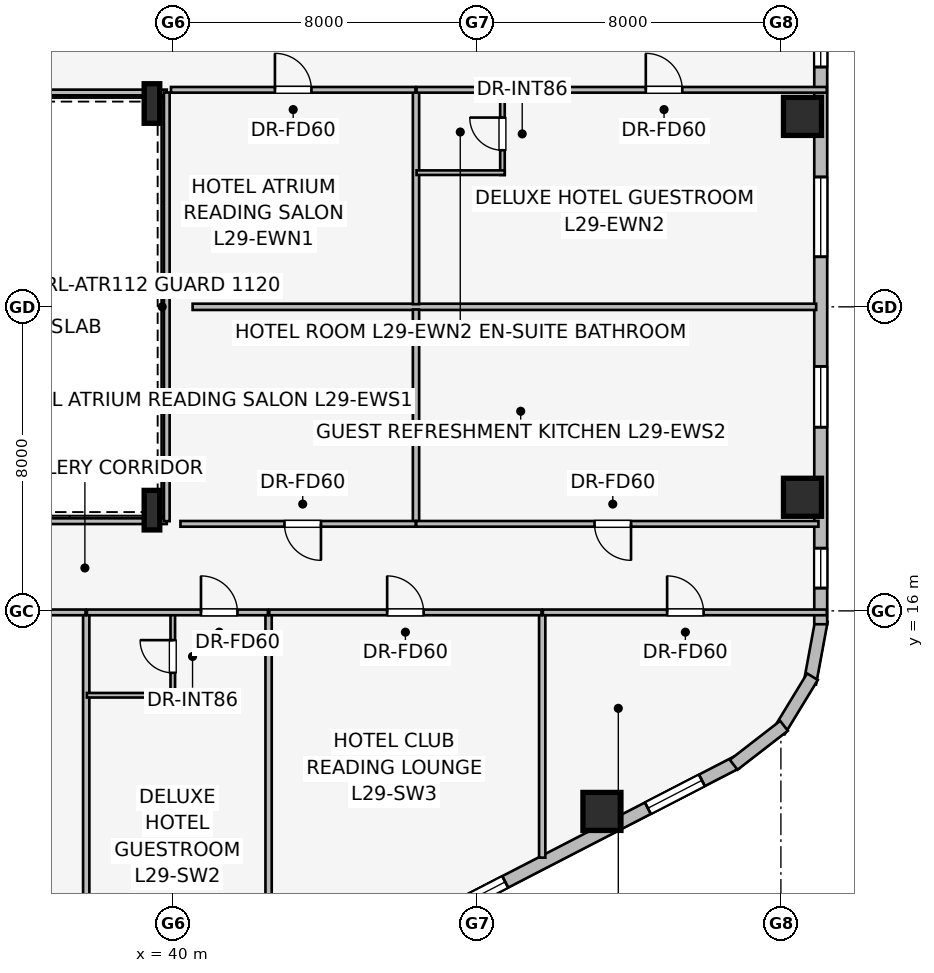
"""IFC4 building model, lengths in metres.
Left out: names, types, materials, properties, quantities, classifications, styles, units other than length and angle.
Written with IfcOpenShell. Run it as: python <this file> out.ifc"""

import sys

from ifc_helpers import new_model, si_unit, direction, frame, frame_2d, origin, origin_2d, place, context, subcontext, project, spatial, rectangle, i_section, extrude, element, fill, save


model = new_model("IFC4")
c1 = context("Model", 3, precision=1e-05, world=origin(), true_north=direction((0.0, 1.0)))
c2 = subcontext(c1, "Body", "Model", "MODEL_VIEW")
j1 = project(units=[si_unit("LENGTHUNIT", "METRE"), si_unit("PLANEANGLEUNIT", "RADIAN")], contexts=[c1])
p1 = place(None, origin())
s1 = spatial("IfcSite", under=j1, at=p1, CompositionType="ELEMENT")
p2 = place(p1, origin())
s2 = spatial("IfcBuilding", under=s1, at=p2, CompositionType="ELEMENT")
p3 = place(p2, frame((0.0, 0.0, 111.9)))
s3 = spatial("IfcBuildingStorey", under=s2, at=p3, CompositionType="ELEMENT", Elevation=111.9)
for number, where, z_axis, x_axis in (
    (1, (51.291, 10.723, 0.0), (0.0, 0.0, 1.0), (1.0, 0.0, 0.0)),
    (2, (56.568, 18.989, 0.0), (0.0, 0.0, 1.0), (1.0, 0.0, 0.0)),
    (3, (56.568, 29.011, 0.0), (0.0, 0.0, 1.0), (1.0, 0.0, 0.0)),
):
    element("IfcColumn", number, at=place(p3, frame(where, z_axis=z_axis, x_axis=x_axis)), inside=s3, PredefinedType="COLUMN", context=c2, shape_type="SweptSolid", body=[
        extrude(rectangle(XDim=1.0, YDim=1.0, at=origin_2d()), origin(), (0.0, 0.0, 1.0), 3.45),
    ])
for number, where, z_axis, x_axis in (
    (4, (39.45, 18.65, 0.0), (0.0, 0.0, 1.0), (1.0, 0.0, 0.0)),
    (5, (39.45, 29.35, 0.0), (0.0, 0.0, 1.0), (1.0, 0.0, 0.0)),
):
    element("IfcColumn", number, at=place(p3, frame(where, z_axis=z_axis, x_axis=x_axis)), inside=s3, PredefinedType="COLUMN", context=c2, shape_type="SweptSolid", body=[
        extrude(i_section(OverallWidth=0.41, OverallDepth=1.041, WebThickness=0.031, FlangeThickness=0.056, at=origin_2d()), origin(), (0.0, 0.0, 1.0), 3.45),
    ])
p4 = place(p3, frame((54.831, 12.01, 0.0), z_axis=(0.0, 0.0, 1.0), x_axis=(-0.888613612362, -0.458656568606, 0.0)))
e6 = element("IfcWall", 6, at=p4, inside=s3, PredefinedType="STANDARD", context=c2, shape_type="SweptSolid", body=[
    extrude(rectangle(XDim=18.681, YDim=0.34, at=frame_2d((9.34, 0.0))), origin(), (0.0, 0.0, 1.0), 3.16),
])
p5 = place(p4, frame((1.023, 0.0, 0.75)))
e7 = element("IfcOpeningElement", 7, at=p5, cuts=e6, PredefinedType="OPENING", context=c2, shape_type="SweptSolid", body=[
    extrude(rectangle(XDim=1.6, YDim=1.55, at=frame_2d((0.8, 0.775))), frame((0.0, 0.18, 0.0), z_axis=(0.0, -1.0, 0.0), x_axis=(1.0, 0.0, 0.0)), (0.0, 0.0, 1.0), 0.36),
])
p6 = place(p4, frame((6.848, 0.0, 0.75)))
e8 = element("IfcOpeningElement", 8, at=p6, cuts=e6, PredefinedType="OPENING", context=c2, shape_type="SweptSolid", body=[
    extrude(rectangle(XDim=2.1, YDim=1.5, at=frame_2d((1.05, 0.75))), frame((0.0, 0.18, 0.0), z_axis=(0.0, -1.0, 0.0), x_axis=(1.0, 0.0, 0.0)), (0.0, 0.0, 1.0), 0.36),
])
p7 = place(p4, frame((10.536, 0.0, 0.75)))
e9 = element("IfcOpeningElement", 9, at=p7, cuts=e6, PredefinedType="OPENING", context=c2, shape_type="SweptSolid", body=[
    extrude(rectangle(XDim=2.1, YDim=1.5, at=frame_2d((1.05, 0.75))), frame((0.0, 0.18, 0.0), z_axis=(0.0, -1.0, 0.0), x_axis=(1.0, 0.0, 0.0)), (0.0, 0.0, 1.0), 0.36),
])
p8 = place(p4, frame((16.058, 0.0, 0.75)))
e10 = element("IfcOpeningElement", 10, at=p8, cuts=e6, PredefinedType="OPENING", context=c2, shape_type="SweptSolid", body=[
    extrude(rectangle(XDim=1.6, YDim=1.55, at=frame_2d((0.8, 0.775))), frame((0.0, 0.18, 0.0), z_axis=(0.0, -1.0, 0.0), x_axis=(1.0, 0.0, 0.0)), (0.0, 0.0, 1.0), 0.36),
])
p9 = place(p3, frame((57.068, 15.742, 0.0), z_axis=(0.0, 0.0, 1.0), x_axis=(-0.181984991895, -0.983301308209, 0.0)))
e11 = element("IfcWall", 11, at=p9, inside=s3, PredefinedType="STANDARD", context=c2, shape_type="SweptSolid", body=[
    extrude(rectangle(XDim=1.677, YDim=0.33, at=frame_2d((0.838, 0.0))), origin(), (0.0, 0.0, 1.0), 3.16),
])
p10 = place(p3, frame((56.83, 14.268, 0.0), z_axis=(0.0, 0.0, 1.0), x_axis=(-0.520519429557, -0.853849824883, 0.0)))
e12 = element("IfcWall", 12, at=p10, inside=s3, PredefinedType="STANDARD", context=c2, shape_type="SweptSolid", body=[
    extrude(rectangle(XDim=1.677, YDim=0.33, at=frame_2d((0.839, 0.0))), origin(), (0.0, 0.0, 1.0), 3.16),
])
p11 = place(p3, frame((56.082, 12.976, 0.0), z_axis=(0.0, 0.0, 1.0), x_axis=(-0.790621329885, -0.612305408053, 0.0)))
e13 = element("IfcWall", 13, at=p11, inside=s3, PredefinedType="STANDARD", context=c2, shape_type="SweptSolid", body=[
    extrude(rectangle(XDim=1.676, YDim=0.33, at=frame_2d((0.838, 0.0))), origin(), (0.0, 0.0, 1.0), 3.16),
])
p12 = place(p3, frame((57.048, 32.352, 0.0), z_axis=(0.0, 0.0, 1.0), x_axis=(0.0, -1.0, 0.0)))
e14 = element("IfcWall", 14, at=p12, inside=s3, PredefinedType="STANDARD", context=c2, shape_type="SweptSolid", body=[
    extrude(rectangle(XDim=16.704, YDim=0.34, at=frame_2d((8.352, 0.0))), origin(), (0.0, 0.0, 1.0), 3.16),
])
p13 = place(p12, frame((0.992, 0.0, 0.75)))
e15 = element("IfcOpeningElement", 15, at=p13, cuts=e14, PredefinedType="OPENING", context=c2, shape_type="SweptSolid", body=[
    extrude(rectangle(XDim=1.05, YDim=1.4, at=frame_2d((0.525, 0.7))), frame((0.0, 0.18, 0.0), z_axis=(0.0, -1.0, 0.0), x_axis=(1.0, 0.0, 0.0)), (0.0, 0.0, 1.0), 0.36),
])
p14 = place(p12, frame((4.935, 0.0, 0.75)))
e16 = element("IfcOpeningElement", 16, at=p14, cuts=e14, PredefinedType="OPENING", context=c2, shape_type="SweptSolid", body=[
    extrude(rectangle(XDim=2.1, YDim=1.5, at=frame_2d((1.05, 0.75))), frame((0.0, 0.18, 0.0), z_axis=(0.0, -1.0, 0.0), x_axis=(1.0, 0.0, 0.0)), (0.0, 0.0, 1.0), 0.36),
])
p15 = place(p12, frame((9.919, 0.0, 0.75)))
e17 = element("IfcOpeningElement", 17, at=p15, cuts=e14, PredefinedType="OPENING", context=c2, shape_type="SweptSolid", body=[
    extrude(rectangle(XDim=1.6, YDim=1.55, at=frame_2d((0.8, 0.775))), frame((0.0, 0.18, 0.0), z_axis=(0.0, -1.0, 0.0), x_axis=(1.0, 0.0, 0.0)), (0.0, 0.0, 1.0), 0.36),
])
p16 = place(p12, frame((14.702, 0.0, 0.75)))
e18 = element("IfcOpeningElement", 18, at=p16, cuts=e14, PredefinedType="OPENING", context=c2, shape_type="SweptSolid", body=[
    extrude(rectangle(XDim=1.05, YDim=1.4, at=frame_2d((0.525, 0.7))), frame((0.0, 0.18, 0.0), z_axis=(0.0, -1.0, 0.0), x_axis=(1.0, 0.0, 0.0)), (0.0, 0.0, 1.0), 0.36),
])
p17 = place(p3, frame((27.675, 18.36, 0.0), z_axis=(0.0, 0.0, 1.0), x_axis=(1.0, 0.0, 0.0)))
e19 = element("IfcWall", 19, at=p17, inside=s3, PredefinedType="PARTITIONING", context=c2, shape_type="SweptSolid", body=[
    extrude(rectangle(XDim=12.165, YDim=0.15, at=frame_2d((6.083, 0.0))), origin(), (0.0, 0.0, 1.0), 2.301),
])
p18 = place(p3, frame((39.84, 29.64, 0.0), z_axis=(0.0, 0.0, 1.0), x_axis=(-1.0, 0.0, 0.0)))
e20 = element("IfcWall", 20, at=p18, inside=s3, PredefinedType="PARTITIONING", context=c2, shape_type="SweptSolid", body=[
    extrude(rectangle(XDim=12.2, YDim=0.15, at=frame_2d((6.1, 0.0))), origin(), (0.0, 0.0, 1.0), 2.301),
])
p19 = place(p3, frame((39.84, 18.36, 0.0), z_axis=(0.0, 0.0, 1.0), x_axis=(0.0, 1.0, 0.0)))
e21 = element("IfcWall", 21, at=p19, inside=s3, PredefinedType="PARTITIONING", context=c2, shape_type="SweptSolid", body=[
    extrude(rectangle(XDim=11.28, YDim=0.15, at=frame_2d((5.64, 0.0))), origin(), (0.0, 0.0, 1.0), 3.16),
])
p20 = place(p3, frame((40.52, 24.0, 0.0), z_axis=(0.0, 0.0, 1.0), x_axis=(1.0, 0.0, 0.0)))
e22 = element("IfcWall", 22, at=p20, inside=s3, PredefinedType="PARTITIONING", context=c2, shape_type="SweptSolid", body=[
    extrude(rectangle(XDim=16.408, YDim=0.165, at=frame_2d((8.204, 0.0))), origin(), (0.0, 0.0, 1.0), 3.16),
])
p21 = place(p3, frame((46.398, 24.07, 0.0), z_axis=(0.0, 0.0, 1.0), x_axis=(0.0, 1.0, 0.0)))
e23 = element("IfcWall", 23, at=p21, inside=s3, PredefinedType="PARTITIONING", context=c2, shape_type="SweptSolid", body=[
    extrude(rectangle(XDim=5.64, YDim=0.165, at=frame_2d((2.82, 0.0))), origin(), (0.0, 0.0, 1.0), 3.16),
])
p22 = place(p3, frame((39.95, 29.71, 0.0), z_axis=(0.0, 0.0, 1.0), x_axis=(1.0, 0.0, 0.0)))
e24 = element("IfcWall", 24, at=p22, inside=s3, PredefinedType="PARTITIONING", context=c2, shape_type="SweptSolid", body=[
    extrude(rectangle(XDim=6.433, YDim=0.15, at=frame_2d((3.217, 0.0))), origin(), (0.0, 0.0, 1.0), 3.16),
])
p23 = place(p22, frame((2.736, 0.0, 0.0)))
e25 = element("IfcOpeningElement", 25, at=p23, cuts=e24, PredefinedType="OPENING", context=c2, shape_type="SweptSolid", body=[
    extrude(rectangle(XDim=0.96, YDim=2.0, at=frame_2d((0.48, 1.0))), frame((0.0, 0.085, 0.0), z_axis=(0.0, -1.0, 0.0), x_axis=(1.0, 0.0, 0.0)), (0.0, 0.0, 1.0), 0.17),
])
p24 = place(p3, frame((48.673, 27.47, 0.0), z_axis=(0.0, 0.0, 1.0), x_axis=(0.0, 1.0, 0.0)))
e26 = element("IfcWall", 26, at=p24, inside=s3, PredefinedType="PARTITIONING", context=c2, shape_type="SweptSolid", body=[
    extrude(rectangle(XDim=2.24, YDim=0.12, at=frame_2d((1.12, 0.0))), origin(), (0.0, 0.0, 1.0), 3.16),
])
p25 = place(p24, frame((0.65, 0.0, 0.0)))
e27 = element("IfcOpeningElement", 27, at=p25, cuts=e26, PredefinedType="OPENING", context=c2, shape_type="SweptSolid", body=[
    extrude(rectangle(XDim=0.86, YDim=2.0, at=frame_2d((0.43, 1.0))), frame((0.0, 0.07, 0.0), z_axis=(0.0, -1.0, 0.0), x_axis=(1.0, 0.0, 0.0)), (0.0, 0.0, 1.0), 0.14),
])
p26 = place(p3, frame((46.413, 27.53, 0.0), z_axis=(0.0, 0.0, 1.0), x_axis=(1.0, 0.0, 0.0)))
e28 = element("IfcWall", 28, at=p26, inside=s3, PredefinedType="PARTITIONING", context=c2, shape_type="SweptSolid", body=[
    extrude(rectangle(XDim=2.32, YDim=0.12, at=frame_2d((1.16, 0.0))), origin(), (0.0, 0.0, 1.0), 3.16),
])
p27 = place(p3, frame((46.413, 29.71, 0.0), z_axis=(0.0, 0.0, 1.0), x_axis=(1.0, 0.0, 0.0)))
e29 = element("IfcWall", 29, at=p27, inside=s3, PredefinedType="PARTITIONING", context=c2, shape_type="SweptSolid", body=[
    extrude(rectangle(XDim=10.795, YDim=0.15, at=frame_2d((5.397, 0.0))), origin(), (0.0, 0.0, 1.0), 3.16),
])
p28 = place(p27, frame((6.032, 0.0, 0.0)))
e30 = element("IfcOpeningElement", 30, at=p28, cuts=e29, PredefinedType="OPENING", context=c2, shape_type="SweptSolid", body=[
    extrude(rectangle(XDim=0.96, YDim=2.0, at=frame_2d((0.48, 1.0))), frame((0.0, 0.085, 0.0), z_axis=(0.0, -1.0, 0.0), x_axis=(1.0, 0.0, 0.0)), (0.0, 0.0, 1.0), 0.17),
])
p29 = place(p3, frame((46.398, 18.29, 0.0), z_axis=(0.0, 0.0, 1.0), x_axis=(0.0, 1.0, 0.0)))
e31 = element("IfcWall", 31, at=p29, inside=s3, PredefinedType="PARTITIONING", context=c2, shape_type="SweptSolid", body=[
    extrude(rectangle(XDim=5.64, YDim=0.165, at=frame_2d((2.82, 0.0))), origin(), (0.0, 0.0, 1.0), 3.16),
])
p30 = place(p3, frame((46.393, 18.29, 0.0), z_axis=(0.0, 0.0, 1.0), x_axis=(-1.0, 0.0, 0.0)))
e32 = element("IfcWall", 32, at=p30, inside=s3, PredefinedType="PARTITIONING", context=c2, shape_type="SweptSolid", body=[
    extrude(rectangle(XDim=6.193, YDim=0.15, at=frame_2d((3.097, 0.0))), origin(), (0.0, 0.0, 1.0), 3.16),
])
p31 = place(p30, frame((2.496, 0.0, 0.0)))
e33 = element("IfcOpeningElement", 33, at=p31, cuts=e32, PredefinedType="OPENING", context=c2, shape_type="SweptSolid", body=[
    extrude(rectangle(XDim=0.96, YDim=2.0, at=frame_2d((0.48, 1.0))), frame((0.0, 0.085, 0.0), z_axis=(0.0, -1.0, 0.0), x_axis=(1.0, 0.0, 0.0)), (0.0, 0.0, 1.0), 0.17),
])
p32 = place(p3, frame((56.988, 18.29, 0.0), z_axis=(0.0, 0.0, 1.0), x_axis=(-1.0, 0.0, 0.0)))
e34 = element("IfcWall", 34, at=p32, inside=s3, PredefinedType="PARTITIONING", context=c2, shape_type="SweptSolid", body=[
    extrude(rectangle(XDim=10.585, YDim=0.15, at=frame_2d((5.292, 0.0))), origin(), (0.0, 0.0, 1.0), 3.16),
])
p33 = place(p32, frame((4.932, 0.0, 0.0)))
e35 = element("IfcOpeningElement", 35, at=p33, cuts=e34, PredefinedType="OPENING", context=c2, shape_type="SweptSolid", body=[
    extrude(rectangle(XDim=0.96, YDim=2.0, at=frame_2d((0.48, 1.0))), frame((0.0, 0.085, 0.0), z_axis=(0.0, -1.0, 0.0), x_axis=(1.0, 0.0, 0.0)), (0.0, 0.0, 1.0), 0.17),
])
p34 = place(p3, frame((37.72, 3.403, 0.0), z_axis=(0.0, 0.0, 1.0), x_axis=(0.0, 1.0, 0.0)))
e36 = element("IfcWall", 36, at=p34, inside=s3, PredefinedType="PARTITIONING", context=c2, shape_type="SweptSolid", body=[
    extrude(rectangle(XDim=12.527, YDim=0.165, at=frame_2d((6.263, 0.0))), origin(), (0.0, 0.0, 1.0), 3.16),
])
p35 = place(p3, frame((42.519, 5.79, 0.0), z_axis=(0.0, 0.0, 1.0), x_axis=(0.0, 1.0, 0.0)))
e37 = element("IfcWall", 37, at=p35, inside=s3, PredefinedType="PARTITIONING", context=c2, shape_type="SweptSolid", body=[
    extrude(rectangle(XDim=10.14, YDim=0.165, at=frame_2d((5.07, 0.0))), origin(), (0.0, 0.0, 1.0), 3.16),
])
p36 = place(p3, frame((49.719, 9.507, 0.0), z_axis=(0.0, 0.0, 1.0), x_axis=(0.0, 1.0, 0.0)))
e38 = element("IfcWall", 38, at=p36, inside=s3, PredefinedType="PARTITIONING", context=c2, shape_type="SweptSolid", body=[
    extrude(rectangle(XDim=6.423, YDim=0.165, at=frame_2d((3.211, 0.0))), origin(), (0.0, 0.0, 1.0), 3.16),
])
p37 = place(p3, frame((32.85, 15.96, 0.0), z_axis=(0.0, 0.0, 1.0), x_axis=(1.0, 0.0, 0.0)))
e39 = element("IfcWall", 39, at=p37, inside=s3, PredefinedType="PARTITIONING", context=c2, shape_type="SweptSolid", body=[
    extrude(rectangle(XDim=4.852, YDim=0.15, at=frame_2d((2.426, 0.0))), origin(), (0.0, 0.0, 1.0), 3.16),
])
p38 = place(p37, frame((1.946, 0.0, 0.0)))
e40 = element("IfcOpeningElement", 40, at=p38, cuts=e39, PredefinedType="OPENING", context=c2, shape_type="SweptSolid", body=[
    extrude(rectangle(XDim=0.96, YDim=2.0, at=frame_2d((0.48, 1.0))), frame((0.0, 0.085, 0.0), z_axis=(0.0, -1.0, 0.0), x_axis=(1.0, 0.0, 0.0)), (0.0, 0.0, 1.0), 0.17),
])
p39 = place(p3, frame((39.998, 13.72, 0.0), z_axis=(0.0, 0.0, 1.0), x_axis=(0.0, 1.0, 0.0)))
e41 = element("IfcWall", 41, at=p39, inside=s3, PredefinedType="PARTITIONING", context=c2, shape_type="SweptSolid", body=[
    extrude(rectangle(XDim=2.24, YDim=0.12, at=frame_2d((1.12, 0.0))), origin(), (0.0, 0.0, 1.0), 2.39),
])
p40 = place(p39, frame((0.65, 0.0, 0.0)))
e42 = element("IfcOpeningElement", 42, at=p40, cuts=e41, PredefinedType="OPENING", context=c2, shape_type="SweptSolid", body=[
    extrude(rectangle(XDim=0.86, YDim=2.0, at=frame_2d((0.43, 1.0))), frame((0.0, 0.07, 0.0), z_axis=(0.0, -1.0, 0.0), x_axis=(1.0, 0.0, 0.0)), (0.0, 0.0, 1.0), 0.14),
])
p41 = place(p3, frame((37.738, 13.78, 0.0), z_axis=(0.0, 0.0, 1.0), x_axis=(1.0, 0.0, 0.0)))
e43 = element("IfcWall", 43, at=p41, inside=s3, PredefinedType="PARTITIONING", context=c2, shape_type="SweptSolid", body=[
    extrude(rectangle(XDim=2.32, YDim=0.12, at=frame_2d((1.16, 0.0))), origin(), (0.0, 0.0, 1.0), 3.16),
])
p42 = place(p3, frame((37.738, 15.96, 0.0), z_axis=(0.0, 0.0, 1.0), x_axis=(1.0, 0.0, 0.0)))
e44 = element("IfcWall", 44, at=p42, inside=s3, PredefinedType="PARTITIONING", context=c2, shape_type="SweptSolid", body=[
    extrude(rectangle(XDim=4.763, YDim=0.15, at=frame_2d((2.381, 0.0))), origin(), (0.0, 0.0, 1.0), 3.16),
])
p43 = place(p42, frame((3.002, 0.0, 0.0)))
e45 = element("IfcOpeningElement", 45, at=p43, cuts=e44, PredefinedType="OPENING", context=c2, shape_type="SweptSolid", body=[
    extrude(rectangle(XDim=0.96, YDim=2.0, at=frame_2d((0.48, 1.0))), frame((0.0, 0.085, 0.0), z_axis=(0.0, -1.0, 0.0), x_axis=(1.0, 0.0, 0.0)), (0.0, 0.0, 1.0), 0.17),
])
p44 = place(p3, frame((42.537, 15.96, 0.0), z_axis=(0.0, 0.0, 1.0), x_axis=(1.0, 0.0, 0.0)))
e46 = element("IfcWall", 46, at=p44, inside=s3, PredefinedType="PARTITIONING", context=c2, shape_type="SweptSolid", body=[
    extrude(rectangle(XDim=7.164, YDim=0.15, at=frame_2d((3.582, 0.0))), origin(), (0.0, 0.0, 1.0), 3.16),
])
p45 = place(p44, frame((3.102, 0.0, 0.0)))
e47 = element("IfcOpeningElement", 47, at=p45, cuts=e46, PredefinedType="OPENING", context=c2, shape_type="SweptSolid", body=[
    extrude(rectangle(XDim=0.96, YDim=2.0, at=frame_2d((0.48, 1.0))), frame((0.0, 0.085, 0.0), z_axis=(0.0, -1.0, 0.0), x_axis=(1.0, 0.0, 0.0)), (0.0, 0.0, 1.0), 0.17),
])
p46 = place(p3, frame((49.737, 15.96, 0.0), z_axis=(0.0, 0.0, 1.0), x_axis=(1.0, 0.0, 0.0)))
e48 = element("IfcWall", 48, at=p46, inside=s3, PredefinedType="PARTITIONING", context=c2, shape_type="SweptSolid", body=[
    extrude(rectangle(XDim=7.471, YDim=0.15, at=frame_2d((3.735, 0.0))), origin(), (0.0, 0.0, 1.0), 3.16),
])
p47 = place(p46, frame((3.269, 0.0, 0.0)))
e49 = element("IfcOpeningElement", 49, at=p47, cuts=e48, PredefinedType="OPENING", context=c2, shape_type="SweptSolid", body=[
    extrude(rectangle(XDim=0.96, YDim=2.0, at=frame_2d((0.48, 1.0))), frame((0.0, 0.085, 0.0), z_axis=(0.0, -1.0, 0.0), x_axis=(1.0, 0.0, 0.0)), (0.0, 0.0, 1.0), 0.17),
])
p48 = place(p5, origin())
e50 = element("IfcWindow", 50, at=p48, inside=s3, PartitioningType="SINGLE_PANEL", PredefinedType="WINDOW", context=c2, shape_type="SweptSolid", body=[
    extrude(rectangle(XDim=1.6, YDim=1.55, at=frame_2d((0.8, 0.775))), frame((0.0, 0.03, 0.0), z_axis=(0.0, -1.0, 0.0), x_axis=(1.0, 0.0, 0.0)), (0.0, 0.0, 1.0), 0.06),
])
fill(e7, e50)
p49 = place(p6, origin())
e51 = element("IfcWindow", 51, at=p49, inside=s3, PartitioningType="SINGLE_PANEL", PredefinedType="WINDOW", context=c2, shape_type="SweptSolid", body=[
    extrude(rectangle(XDim=2.1, YDim=1.5, at=frame_2d((1.05, 0.75))), frame((0.0, 0.03, 0.0), z_axis=(0.0, -1.0, 0.0), x_axis=(1.0, 0.0, 0.0)), (0.0, 0.0, 1.0), 0.06),
])
fill(e8, e51)
p50 = place(p13, origin())
e52 = element("IfcWindow", 52, at=p50, inside=s3, PartitioningType="SINGLE_PANEL", PredefinedType="WINDOW", context=c2, shape_type="SweptSolid", body=[
    extrude(rectangle(XDim=1.05, YDim=1.4, at=frame_2d((0.525, 0.7))), frame((0.0, 0.03, 0.0), z_axis=(0.0, -1.0, 0.0), x_axis=(1.0, 0.0, 0.0)), (0.0, 0.0, 1.0), 0.06),
])
fill(e15, e52)
p51 = place(p14, origin())
e53 = element("IfcWindow", 53, at=p51, inside=s3, PartitioningType="SINGLE_PANEL", PredefinedType="WINDOW", context=c2, shape_type="SweptSolid", body=[
    extrude(rectangle(XDim=2.1, YDim=1.5, at=frame_2d((1.05, 0.75))), frame((0.0, 0.03, 0.0), z_axis=(0.0, -1.0, 0.0), x_axis=(1.0, 0.0, 0.0)), (0.0, 0.0, 1.0), 0.06),
])
fill(e16, e53)
p52 = place(p15, origin())
e54 = element("IfcWindow", 54, at=p52, inside=s3, PartitioningType="SINGLE_PANEL", PredefinedType="WINDOW", context=c2, shape_type="SweptSolid", body=[
    extrude(rectangle(XDim=1.6, YDim=1.55, at=frame_2d((0.8, 0.775))), frame((0.0, 0.03, 0.0), z_axis=(0.0, -1.0, 0.0), x_axis=(1.0, 0.0, 0.0)), (0.0, 0.0, 1.0), 0.06),
])
fill(e17, e54)
p53 = place(p16, origin())
e55 = element("IfcWindow", 55, at=p53, inside=s3, PartitioningType="SINGLE_PANEL", PredefinedType="WINDOW", context=c2, shape_type="SweptSolid", body=[
    extrude(rectangle(XDim=1.05, YDim=1.4, at=frame_2d((0.525, 0.7))), frame((0.0, 0.03, 0.0), z_axis=(0.0, -1.0, 0.0), x_axis=(1.0, 0.0, 0.0)), (0.0, 0.0, 1.0), 0.06),
])
fill(e18, e55)
p54 = place(p23, origin())
e56 = element("IfcDoor", 56, at=p54, inside=s3, OperationType="SINGLE_SWING_LEFT", PredefinedType="DOOR", context=c2, shape_type="SweptSolid", body=[
    extrude(rectangle(XDim=0.96, YDim=2.0, at=frame_2d((0.48, 1.0))), frame((0.0, 0.025, 0.0), z_axis=(0.0, -1.0, 0.0), x_axis=(1.0, 0.0, 0.0)), (0.0, 0.0, 1.0), 0.05),
])
fill(e25, e56)
p55 = place(p25, origin())
e57 = element("IfcDoor", 57, at=p55, inside=s3, OperationType="SINGLE_SWING_RIGHT", PredefinedType="DOOR", context=c2, shape_type="SweptSolid", body=[
    extrude(rectangle(XDim=0.86, YDim=2.0, at=frame_2d((0.43, 1.0))), frame((0.0, 0.025, 0.0), z_axis=(0.0, -1.0, 0.0), x_axis=(1.0, 0.0, 0.0)), (0.0, 0.0, 1.0), 0.05),
])
fill(e27, e57)
p56 = place(p28, origin())
e58 = element("IfcDoor", 58, at=p56, inside=s3, OperationType="SINGLE_SWING_LEFT", PredefinedType="DOOR", context=c2, shape_type="SweptSolid", body=[
    extrude(rectangle(XDim=0.96, YDim=2.0, at=frame_2d((0.48, 1.0))), frame((0.0, 0.025, 0.0), z_axis=(0.0, -1.0, 0.0), x_axis=(1.0, 0.0, 0.0)), (0.0, 0.0, 1.0), 0.05),
])
fill(e30, e58)
p57 = place(p31, origin())
e59 = element("IfcDoor", 59, at=p57, inside=s3, OperationType="SINGLE_SWING_LEFT", PredefinedType="DOOR", context=c2, shape_type="SweptSolid", body=[
    extrude(rectangle(XDim=0.96, YDim=2.0, at=frame_2d((0.48, 1.0))), frame((0.0, 0.025, 0.0), z_axis=(0.0, -1.0, 0.0), x_axis=(1.0, 0.0, 0.0)), (0.0, 0.0, 1.0), 0.05),
])
fill(e33, e59)
p58 = place(p33, origin())
e60 = element("IfcDoor", 60, at=p58, inside=s3, OperationType="SINGLE_SWING_LEFT", PredefinedType="DOOR", context=c2, shape_type="SweptSolid", body=[
    extrude(rectangle(XDim=0.96, YDim=2.0, at=frame_2d((0.48, 1.0))), frame((0.0, 0.025, 0.0), z_axis=(0.0, -1.0, 0.0), x_axis=(1.0, 0.0, 0.0)), (0.0, 0.0, 1.0), 0.05),
])
fill(e35, e60)
p59 = place(p40, origin())
e61 = element("IfcDoor", 61, at=p59, inside=s3, OperationType="SINGLE_SWING_RIGHT", PredefinedType="DOOR", context=c2, shape_type="SweptSolid", body=[
    extrude(rectangle(XDim=0.86, YDim=2.0, at=frame_2d((0.43, 1.0))), frame((0.0, 0.025, 0.0), z_axis=(0.0, -1.0, 0.0), x_axis=(1.0, 0.0, 0.0)), (0.0, 0.0, 1.0), 0.05),
])
fill(e42, e61)
p60 = place(p43, origin())
e62 = element("IfcDoor", 62, at=p60, inside=s3, OperationType="SINGLE_SWING_LEFT", PredefinedType="DOOR", context=c2, shape_type="SweptSolid", body=[
    extrude(rectangle(XDim=0.96, YDim=2.0, at=frame_2d((0.48, 1.0))), frame((0.0, 0.025, 0.0), z_axis=(0.0, -1.0, 0.0), x_axis=(1.0, 0.0, 0.0)), (0.0, 0.0, 1.0), 0.05),
])
fill(e45, e62)
p61 = place(p45, origin())
e63 = element("IfcDoor", 63, at=p61, inside=s3, OperationType="SINGLE_SWING_LEFT", PredefinedType="DOOR", context=c2, shape_type="SweptSolid", body=[
    extrude(rectangle(XDim=0.96, YDim=2.0, at=frame_2d((0.48, 1.0))), frame((0.0, 0.025, 0.0), z_axis=(0.0, -1.0, 0.0), x_axis=(1.0, 0.0, 0.0)), (0.0, 0.0, 1.0), 0.05),
])
fill(e47, e63)
p62 = place(p47, origin())
e64 = element("IfcDoor", 64, at=p62, inside=s3, OperationType="SINGLE_SWING_LEFT", PredefinedType="DOOR", context=c2, shape_type="SweptSolid", body=[
    extrude(rectangle(XDim=0.96, YDim=2.0, at=frame_2d((0.48, 1.0))), frame((0.0, 0.025, 0.0), z_axis=(0.0, -1.0, 0.0), x_axis=(1.0, 0.0, 0.0)), (0.0, 0.0, 1.0), 0.05),
])
fill(e49, e64)
save(model, sys.argv[1])
